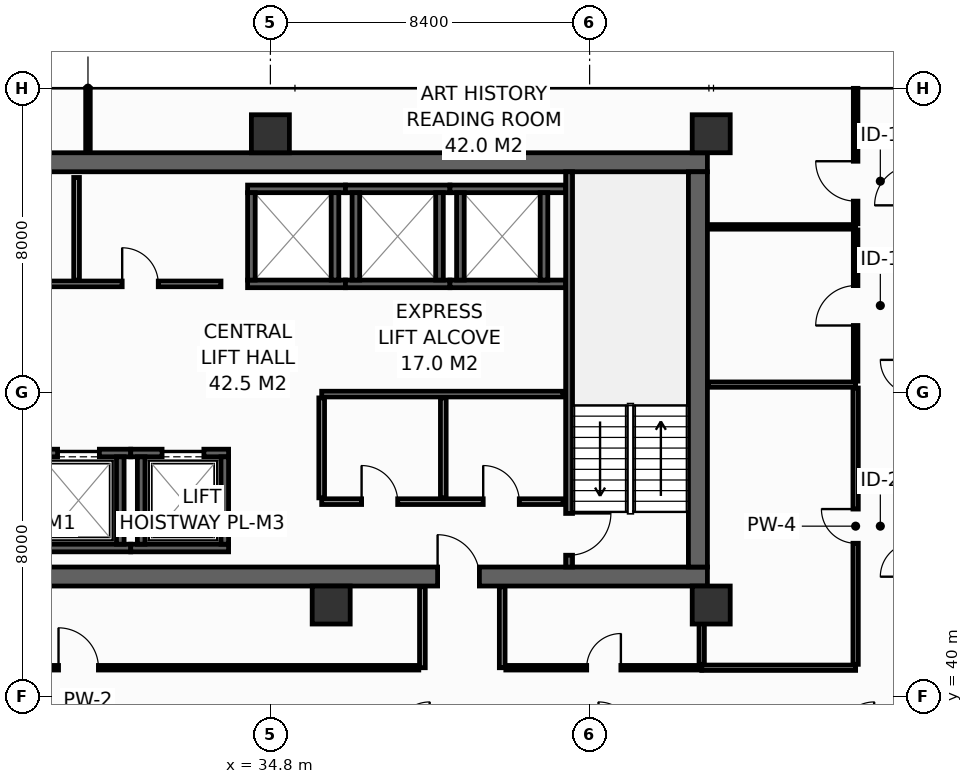
"""IFC4 building model, lengths in metres.
Left out: names, types, materials, properties, quantities, classifications, styles, units other than length and angle.
Written with IfcOpenShell. Run it as: python <this file> out.ifc"""

import sys

from ifc_helpers import new_model, si_unit, direction, frame, frame_2d, origin, origin_2d, place, context, subcontext, project, spatial, rectangle, hollow_rectangle, extrude, element, fill, save


model = new_model("IFC4")
c1 = context("Model", 3, precision=1e-05, world=origin(), true_north=direction((0.0, 1.0)))
c2 = subcontext(c1, "Body", "Model", "MODEL_VIEW")
j1 = project(units=[si_unit("LENGTHUNIT", "METRE"), si_unit("PLANEANGLEUNIT", "RADIAN")], contexts=[c1])
p1 = place(None, origin())
s1 = spatial("IfcSite", under=j1, at=p1, CompositionType="ELEMENT")
p2 = place(p1, origin())
s2 = spatial("IfcBuilding", under=s1, at=p2, CompositionType="ELEMENT")
p3 = place(p2, frame((0.0, 0.0, 137.2)))
s3 = spatial("IfcBuildingStorey", under=s2, at=p3, CompositionType="ELEMENT", Elevation=137.2)
p4 = place(p3, frame((13.6, 43.15, 0.0), z_axis=(0.0, 0.0, 1.0), x_axis=(1.0, 0.0, 0.0)))
e1 = element("IfcWall", 1, at=p4, inside=s3, PredefinedType="SHEAR", context=c2, shape_type="SweptSolid", body=[
    extrude(rectangle(XDim=32.7, YDim=0.5, at=frame_2d((16.35, 0.0))), origin(), (0.0, 0.0, 1.0), 3.55),
])
p5 = place(p4, frame((5.4, 0.0, 0.0)))
e2 = element("IfcOpeningElement", 2, at=p5, cuts=e1, PredefinedType="OPENING", context=c2, shape_type="SweptSolid", body=[
    extrude(rectangle(XDim=1.1, YDim=2.15, at=frame_2d((0.55, 1.075))), frame((0.0, 0.26, 0.0), z_axis=(0.0, -1.0, 0.0), x_axis=(1.0, 0.0, 0.0)), (0.0, 0.0, 1.0), 0.52),
])
p6 = place(p4, frame((25.6, 0.0, 0.0)))
e3 = element("IfcOpeningElement", 3, at=p6, cuts=e1, PredefinedType="OPENING", context=c2, shape_type="SweptSolid", body=[
    extrude(rectangle(XDim=1.1, YDim=2.15, at=frame_2d((0.55, 1.075))), frame((0.0, 0.26, 0.0), z_axis=(0.0, -1.0, 0.0), x_axis=(1.0, 0.0, 0.0)), (0.0, 0.0, 1.0), 0.52),
])
p7 = place(p3, frame((13.6, 54.05, 0.0), z_axis=(0.0, 0.0, 1.0), x_axis=(1.0, 0.0, 0.0)))
e4 = element("IfcWall", 4, at=p7, inside=s3, PredefinedType="SHEAR", context=c2, shape_type="SweptSolid", body=[
    extrude(rectangle(XDim=32.7, YDim=0.5, at=frame_2d((16.35, 0.0))), origin(), (0.0, 0.0, 1.0), 3.55),
])
p8 = place(p3, frame((46.05, 43.4, 0.0), z_axis=(0.0, 0.0, 1.0), x_axis=(0.0, 1.0, 0.0)))
e5 = element("IfcWall", 5, at=p8, inside=s3, PredefinedType="SHEAR", context=c2, shape_type="SweptSolid", body=[
    extrude(rectangle(XDim=10.4, YDim=0.5, at=frame_2d((5.2, 0.0))), origin(), (0.0, 0.0, 1.0), 3.55),
])
for number, where, z_axis, x_axis in (
    (6, (34.8, 54.8, 0.0), (0.0, 0.0, 1.0), (1.0, 0.0, 0.0)),
    (7, (46.4, 54.8, 0.0), (0.0, 0.0, 1.0), (1.0, 0.0, 0.0)),
    (8, (36.4, 42.4, 0.0), (0.0, 0.0, 1.0), (1.0, 0.0, 0.0)),
    (9, (46.4, 42.4, 0.0), (0.0, 0.0, 1.0), (1.0, 0.0, 0.0)),
):
    element("IfcColumn", number, at=place(p3, frame(where, z_axis=z_axis, x_axis=x_axis)), inside=s3, PredefinedType="COLUMN", context=c2, shape_type="SweptSolid", body=[
        extrude(hollow_rectangle(XDim=1.0, YDim=1.0, WallThickness=0.045, at=origin_2d()), origin(), (0.0, 0.0, 1.0), 3.8),
    ])
p9 = place(p3, frame((28.375, 43.9, 0.0), z_axis=(0.0, 0.0, 1.0), x_axis=(1.0, 0.0, 0.0)))
e10 = element("IfcWall", 10, at=p9, inside=s3, PredefinedType="SHEAR", context=c2, shape_type="SweptSolid", body=[
    extrude(rectangle(XDim=2.75, YDim=0.2, at=frame_2d((1.375, 0.0))), origin(), (0.0, 0.0, 1.0), 3.55),
])
p10 = place(p3, frame((28.375, 46.4, 0.0), z_axis=(0.0, 0.0, 1.0), x_axis=(1.0, 0.0, 0.0)))
e11 = element("IfcWall", 11, at=p10, inside=s3, PredefinedType="SHEAR", context=c2, shape_type="SweptSolid", body=[
    extrude(rectangle(XDim=2.75, YDim=0.2, at=frame_2d((1.375, 0.0))), origin(), (0.0, 0.0, 1.0), 3.55),
])
p11 = place(p10, frame((0.825, 0.0, 0.0)))
e12 = element("IfcOpeningElement", 12, at=p11, cuts=e11, PredefinedType="OPENING", context=c2, shape_type="SweptSolid", body=[
    extrude(rectangle(XDim=1.1, YDim=2.2, at=frame_2d((0.55, 1.1))), frame((0.0, 0.11, 0.0), z_axis=(0.0, -1.0, 0.0), x_axis=(1.0, 0.0, 0.0)), (0.0, 0.0, 1.0), 0.22),
])
p12 = place(p3, frame((30.85, 44.0, 0.0), z_axis=(0.0, 0.0, 1.0), x_axis=(0.0, 1.0, 0.0)))
e13 = element("IfcWall", 13, at=p12, inside=s3, PredefinedType="SHEAR", context=c2, shape_type="SweptSolid", body=[
    extrude(rectangle(XDim=2.3, YDim=0.2, at=frame_2d((1.15, 0.0))), origin(), (0.0, 0.0, 1.0), 3.55),
])
p13 = place(p3, frame((31.125, 43.9, 0.0), z_axis=(0.0, 0.0, 1.0), x_axis=(1.0, 0.0, 0.0)))
e14 = element("IfcWall", 14, at=p13, inside=s3, PredefinedType="SHEAR", context=c2, shape_type="SweptSolid", body=[
    extrude(rectangle(XDim=2.575, YDim=0.2, at=frame_2d((1.288, 0.0))), origin(), (0.0, 0.0, 1.0), 3.55),
])
p14 = place(p3, frame((31.125, 46.4, 0.0), z_axis=(0.0, 0.0, 1.0), x_axis=(1.0, 0.0, 0.0)))
e15 = element("IfcWall", 15, at=p14, inside=s3, PredefinedType="SHEAR", context=c2, shape_type="SweptSolid", body=[
    extrude(rectangle(XDim=2.575, YDim=0.2, at=frame_2d((1.288, 0.0))), origin(), (0.0, 0.0, 1.0), 3.55),
])
p15 = place(p14, frame((0.825, 0.0, 0.0)))
e16 = element("IfcOpeningElement", 16, at=p15, cuts=e15, PredefinedType="OPENING", context=c2, shape_type="SweptSolid", body=[
    extrude(rectangle(XDim=1.1, YDim=2.2, at=frame_2d((0.55, 1.1))), frame((0.0, 0.11, 0.0), z_axis=(0.0, -1.0, 0.0), x_axis=(1.0, 0.0, 0.0)), (0.0, 0.0, 1.0), 0.22),
])
for number, where, z_axis, x_axis in (
    (17, (31.4, 44.0, 0.0), (0.0, 0.0, 1.0), (0.0, 1.0, 0.0)),
    (18, (33.6, 44.0, 0.0), (0.0, 0.0, 1.0), (0.0, 1.0, 0.0)),
):
    element("IfcWall", number, at=place(p3, frame(where, z_axis=z_axis, x_axis=x_axis)), inside=s3, PredefinedType="SHEAR", context=c2, shape_type="SweptSolid", body=[
        extrude(rectangle(XDim=2.3, YDim=0.2, at=frame_2d((1.15, 0.0))), origin(), (0.0, 0.0, 1.0), 3.55),
    ])
for number, where, z_axis, x_axis in (
    (19, (34.2, 50.85, 0.0), (0.0, 0.0, 1.0), (1.0, 0.0, 0.0)),
    (20, (34.2, 53.35, 0.0), (0.0, 0.0, 1.0), (1.0, 0.0, 0.0)),
):
    element("IfcWall", number, at=place(p3, frame(where, z_axis=z_axis, x_axis=x_axis)), inside=s3, PredefinedType="SHEAR", context=c2, shape_type="SweptSolid", body=[
        extrude(rectangle(XDim=2.575, YDim=0.2, at=frame_2d((1.288, 0.0))), origin(), (0.0, 0.0, 1.0), 3.55),
    ])
for number, where, z_axis, x_axis in (
    (21, (34.3, 50.95, 0.0), (0.0, 0.0, 1.0), (0.0, 1.0, 0.0)),
    (22, (36.5, 50.95, 0.0), (0.0, 0.0, 1.0), (0.0, 1.0, 0.0)),
):
    element("IfcWall", number, at=place(p3, frame(where, z_axis=z_axis, x_axis=x_axis)), inside=s3, PredefinedType="SHEAR", context=c2, shape_type="SweptSolid", body=[
        extrude(rectangle(XDim=2.3, YDim=0.2, at=frame_2d((1.15, 0.0))), origin(), (0.0, 0.0, 1.0), 3.55),
    ])
for number, where, z_axis, x_axis in (
    (23, (36.775, 50.85, 0.0), (0.0, 0.0, 1.0), (1.0, 0.0, 0.0)),
    (24, (36.775, 53.35, 0.0), (0.0, 0.0, 1.0), (1.0, 0.0, 0.0)),
):
    element("IfcWall", number, at=place(p3, frame(where, z_axis=z_axis, x_axis=x_axis)), inside=s3, PredefinedType="SHEAR", context=c2, shape_type="SweptSolid", body=[
        extrude(rectangle(XDim=2.75, YDim=0.2, at=frame_2d((1.375, 0.0))), origin(), (0.0, 0.0, 1.0), 3.55),
    ])
for number, where, z_axis, x_axis in (
    (25, (37.05, 50.95, 0.0), (0.0, 0.0, 1.0), (0.0, 1.0, 0.0)),
    (26, (39.25, 50.95, 0.0), (0.0, 0.0, 1.0), (0.0, 1.0, 0.0)),
):
    element("IfcWall", number, at=place(p3, frame(where, z_axis=z_axis, x_axis=x_axis)), inside=s3, PredefinedType="SHEAR", context=c2, shape_type="SweptSolid", body=[
        extrude(rectangle(XDim=2.3, YDim=0.2, at=frame_2d((1.15, 0.0))), origin(), (0.0, 0.0, 1.0), 3.55),
    ])
for number, where, z_axis, x_axis in (
    (27, (39.525, 50.85, 0.0), (0.0, 0.0, 1.0), (1.0, 0.0, 0.0)),
    (28, (39.525, 53.35, 0.0), (0.0, 0.0, 1.0), (1.0, 0.0, 0.0)),
):
    element("IfcWall", number, at=place(p3, frame(where, z_axis=z_axis, x_axis=x_axis)), inside=s3, PredefinedType="SHEAR", context=c2, shape_type="SweptSolid", body=[
        extrude(rectangle(XDim=3.045, YDim=0.2, at=frame_2d((1.522, 0.0))), origin(), (0.0, 0.0, 1.0), 3.55),
    ])
for number, where, z_axis, x_axis in (
    (29, (39.8, 50.95, 0.0), (0.0, 0.0, 1.0), (0.0, 1.0, 0.0)),
    (30, (42.0, 50.95, 0.0), (0.0, 0.0, 1.0), (0.0, 1.0, 0.0)),
):
    element("IfcWall", number, at=place(p3, frame(where, z_axis=z_axis, x_axis=x_axis)), inside=s3, PredefinedType="SHEAR", context=c2, shape_type="SweptSolid", body=[
        extrude(rectangle(XDim=2.3, YDim=0.2, at=frame_2d((1.15, 0.0))), origin(), (0.0, 0.0, 1.0), 3.55),
    ])
p16 = place(p3, frame((42.66, 53.8, 0.0), z_axis=(0.0, 0.0, 1.0), x_axis=(0.0, -1.0, 0.0)))
e31 = element("IfcWall", 31, at=p16, inside=s3, PredefinedType="SHEAR", context=c2, shape_type="SweptSolid", body=[
    extrude(rectangle(XDim=10.4, YDim=0.18, at=frame_2d((5.2, 0.0))), origin(), (0.0, 0.0, 1.0), 3.55),
])
p17 = place(p16, frame((8.99, 0.0, 0.0)))
e32 = element("IfcOpeningElement", 32, at=p17, cuts=e31, PredefinedType="OPENING", context=c2, shape_type="SweptSolid", body=[
    extrude(rectangle(XDim=1.1, YDim=2.15, at=frame_2d((0.55, 1.075))), frame((0.0, 0.1, 0.0), z_axis=(0.0, -1.0, 0.0), x_axis=(1.0, 0.0, 0.0)), (0.0, 0.0, 1.0), 0.2),
])
p18 = place(p3, frame((36.15, 45.12, 0.0), z_axis=(0.0, 0.0, 1.0), x_axis=(1.0, 0.0, 0.0)))
e33 = element("IfcWall", 33, at=p18, inside=s3, PredefinedType="PARTITIONING", context=c2, shape_type="SweptSolid", body=[
    extrude(rectangle(XDim=6.35, YDim=0.15, at=frame_2d((3.175, 0.0))), origin(), (0.0, 0.0, 1.0), 3.55),
])
p19 = place(p18, frame((1.05, 0.0, 0.0)))
e34 = element("IfcOpeningElement", 34, at=p19, cuts=e33, PredefinedType="OPENING", context=c2, shape_type="SweptSolid", body=[
    extrude(rectangle(XDim=0.95, YDim=2.15, at=frame_2d((0.475, 1.075))), frame((0.0, 0.085, 0.0), z_axis=(0.0, -1.0, 0.0), x_axis=(1.0, 0.0, 0.0)), (0.0, 0.0, 1.0), 0.17),
])
p20 = place(p18, frame((4.25, 0.0, 0.0)))
e35 = element("IfcOpeningElement", 35, at=p20, cuts=e33, PredefinedType="OPENING", context=c2, shape_type="SweptSolid", body=[
    extrude(rectangle(XDim=0.95, YDim=2.15, at=frame_2d((0.475, 1.075))), frame((0.0, 0.085, 0.0), z_axis=(0.0, -1.0, 0.0), x_axis=(1.0, 0.0, 0.0)), (0.0, 0.0, 1.0), 0.17),
])
p21 = place(p3, frame((36.15, 47.95, 0.0), z_axis=(0.0, 0.0, 1.0), x_axis=(1.0, 0.0, 0.0)))
e36 = element("IfcWall", 36, at=p21, inside=s3, PredefinedType="PARTITIONING", context=c2, shape_type="SweptSolid", body=[
    extrude(rectangle(XDim=6.35, YDim=0.15, at=frame_2d((3.175, 0.0))), origin(), (0.0, 0.0, 1.0), 3.55),
])
for number, where, z_axis, x_axis in (
    (37, (36.15, 45.22, 0.0), (0.0, 0.0, 1.0), (0.0, 1.0, 0.0)),
    (38, (39.35, 45.22, 0.0), (0.0, 0.0, 1.0), (0.0, 1.0, 0.0)),
):
    element("IfcWall", number, at=place(p3, frame(where, z_axis=z_axis, x_axis=x_axis)), inside=s3, PredefinedType="PARTITIONING", context=c2, shape_type="SweptSolid", body=[
        extrude(rectangle(XDim=2.63, YDim=0.15, at=frame_2d((1.315, 0.0))), origin(), (0.0, 0.0, 1.0), 3.55),
    ])
p22 = place(p3, frame((25.85, 50.85, 0.0), z_axis=(0.0, 0.0, 1.0), x_axis=(1.0, 0.0, 0.0)))
e39 = element("IfcWall", 39, at=p22, inside=s3, PredefinedType="PARTITIONING", context=c2, shape_type="SweptSolid", body=[
    extrude(rectangle(XDim=7.65, YDim=0.15, at=frame_2d((3.825, 0.0))), origin(), (0.0, 0.0, 1.0), 3.55),
])
p23 = place(p22, frame((1.25, 0.0, 0.0)))
e40 = element("IfcOpeningElement", 40, at=p23, cuts=e39, PredefinedType="OPENING", context=c2, shape_type="SweptSolid", body=[
    extrude(rectangle(XDim=0.95, YDim=2.15, at=frame_2d((0.475, 1.075))), frame((0.0, 0.085, 0.0), z_axis=(0.0, -1.0, 0.0), x_axis=(1.0, 0.0, 0.0)), (0.0, 0.0, 1.0), 0.17),
])
p24 = place(p22, frame((5.05, 0.0, 0.0)))
e41 = element("IfcOpeningElement", 41, at=p24, cuts=e39, PredefinedType="OPENING", context=c2, shape_type="SweptSolid", body=[
    extrude(rectangle(XDim=0.95, YDim=2.15, at=frame_2d((0.475, 1.075))), frame((0.0, 0.085, 0.0), z_axis=(0.0, -1.0, 0.0), x_axis=(1.0, 0.0, 0.0)), (0.0, 0.0, 1.0), 0.17),
])
p25 = place(p3, frame((29.7, 50.95, 0.0), z_axis=(0.0, 0.0, 1.0), x_axis=(0.0, 1.0, 0.0)))
e42 = element("IfcWall", 42, at=p25, inside=s3, PredefinedType="PARTITIONING", context=c2, shape_type="SweptSolid", body=[
    extrude(rectangle(XDim=2.7, YDim=0.15, at=frame_2d((1.35, 0.0))), origin(), (0.0, 0.0, 1.0), 3.55),
])
p26 = place(p3, frame((46.15, 40.75, 0.0), z_axis=(0.0, 0.0, 1.0), x_axis=(1.0, 0.0, 0.0)))
e43 = element("IfcWall", 43, at=p26, inside=s3, PredefinedType="PARTITIONING", context=c2, shape_type="SweptSolid", body=[
    extrude(rectangle(XDim=4.05, YDim=0.14, at=frame_2d((2.025, 0.0))), origin(), (0.0, 0.0, 1.0), 3.55),
])
p27 = place(p3, frame((46.15, 40.84, 0.0), z_axis=(0.0, 0.0, 1.0), x_axis=(0.0, 1.0, 0.0)))
e44 = element("IfcWall", 44, at=p27, inside=s3, PredefinedType="PARTITIONING", context=c2, shape_type="SweptSolid", body=[
    extrude(rectangle(XDim=2.04, YDim=0.14, at=frame_2d((1.02, 0.0))), origin(), (0.0, 0.0, 1.0), 3.55),
])
p28 = place(p3, frame((46.32, 48.2, 0.0), z_axis=(0.0, 0.0, 1.0), x_axis=(1.0, 0.0, 0.0)))
e45 = element("IfcWall", 45, at=p28, inside=s3, PredefinedType="PARTITIONING", context=c2, shape_type="SweptSolid", body=[
    extrude(rectangle(XDim=3.88, YDim=0.14, at=frame_2d((1.94, 0.0))), origin(), (0.0, 0.0, 1.0), 3.55),
])
p29 = place(p3, frame((50.2, 40.84, 0.0), z_axis=(0.0, 0.0, 1.0), x_axis=(0.0, 1.0, 0.0)))
e46 = element("IfcWall", 46, at=p29, inside=s3, PredefinedType="PARTITIONING", context=c2, shape_type="SweptSolid", body=[
    extrude(rectangle(XDim=7.27, YDim=0.14, at=frame_2d((3.635, 0.0))), origin(), (0.0, 0.0, 1.0), 2.835),
])
p30 = place(p29, frame((3.185, 0.0, 0.0)))
e47 = element("IfcOpeningElement", 47, at=p30, cuts=e46, PredefinedType="OPENING", context=c2, shape_type="SweptSolid", body=[
    extrude(rectangle(XDim=0.9, YDim=2.1, at=frame_2d((0.45, 1.05))), frame((0.0, 0.08, 0.0), z_axis=(0.0, -1.0, 0.0), x_axis=(1.0, 0.0, 0.0)), (0.0, 0.0, 1.0), 0.16),
])
p31 = place(p3, frame((46.32, 52.35, 0.0), z_axis=(0.0, 0.0, 1.0), x_axis=(1.0, 0.0, 0.0)))
e48 = element("IfcWall", 48, at=p31, inside=s3, PredefinedType="PARTITIONING", context=c2, shape_type="SweptSolid", body=[
    extrude(rectangle(XDim=3.88, YDim=0.12, at=frame_2d((1.94, 0.0))), origin(), (0.0, 0.0, 1.0), 3.55),
])
p32 = place(p3, frame((30.0, 54.32, 0.0), z_axis=(0.0, 0.0, 1.0), x_axis=(0.0, 1.0, 0.0)))
e49 = element("IfcWall", 49, at=p32, inside=s3, PredefinedType="PARTITIONING", context=c2, shape_type="SweptSolid", body=[
    extrude(rectangle(XDim=1.675, YDim=0.12, at=frame_2d((0.837, 0.0))), origin(), (0.0, 0.0, 1.0), 2.935),
])
p33 = place(p3, frame((50.2, 48.29, 0.0), z_axis=(0.0, 0.0, 1.0), x_axis=(0.0, 1.0, 0.0)))
e50 = element("IfcWall", 50, at=p33, inside=s3, PredefinedType="PARTITIONING", context=c2, shape_type="SweptSolid", body=[
    extrude(rectangle(XDim=3.98, YDim=0.12, at=frame_2d((1.99, 0.0))), origin(), (0.0, 0.0, 1.0), 3.55),
])
p34 = place(p33, frame((1.465, 0.0, 0.0)))
e51 = element("IfcOpeningElement", 51, at=p34, cuts=e50, PredefinedType="OPENING", context=c2, shape_type="SweptSolid", body=[
    extrude(rectangle(XDim=1.05, YDim=2.15, at=frame_2d((0.525, 1.075))), frame((0.0, 0.07, 0.0), z_axis=(0.0, -1.0, 0.0), x_axis=(1.0, 0.0, 0.0)), (0.0, 0.0, 1.0), 0.14),
])
p35 = place(p3, frame((50.2, 52.43, 0.0), z_axis=(0.0, 0.0, 1.0), x_axis=(0.0, 1.0, 0.0)))
e52 = element("IfcWall", 52, at=p35, inside=s3, PredefinedType="PARTITIONING", context=c2, shape_type="SweptSolid", body=[
    extrude(rectangle(XDim=3.565, YDim=0.12, at=frame_2d((1.783, 0.0))), origin(), (0.0, 0.0, 1.0), 2.935),
])
p36 = place(p35, frame((0.597, 0.0, 0.0)))
e53 = element("IfcOpeningElement", 53, at=p36, cuts=e52, PredefinedType="OPENING", context=c2, shape_type="SweptSolid", body=[
    extrude(rectangle(XDim=1.05, YDim=2.15, at=frame_2d((0.525, 1.075))), frame((0.0, 0.07, 0.0), z_axis=(0.0, -1.0, 0.0), x_axis=(1.0, 0.0, 0.0)), (0.0, 0.0, 1.0), 0.14),
])
for number, where, z_axis, x_axis in (
    (54, (38.8, 40.75, 0.0), (0.0, 0.0, 1.0), (0.0, 1.0, 0.0)),
    (55, (40.9, 40.75, 0.0), (0.0, 0.0, 1.0), (0.0, 1.0, 0.0)),
):
    element("IfcWall", number, at=place(p3, frame(where, z_axis=z_axis, x_axis=x_axis)), inside=s3, PredefinedType="PARTITIONING", context=c2, shape_type="SweptSolid", body=[
        extrude(rectangle(XDim=2.13, YDim=0.15, at=frame_2d((1.065, 0.0))), origin(), (0.0, 0.0, 1.0), 3.55),
    ])
p37 = place(p3, frame((20.795, 40.75, 0.0), z_axis=(0.0, 0.0, 1.0), x_axis=(1.0, 0.0, 0.0)))
e56 = element("IfcWall", 56, at=p37, inside=s3, PredefinedType="PARTITIONING", context=c2, shape_type="SweptSolid", body=[
    extrude(rectangle(XDim=17.91, YDim=0.12, at=frame_2d((8.955, 0.0))), origin(), (0.0, 0.0, 1.0), 2.835),
])
p38 = place(p37, frame((8.43, 0.0, 0.0)))
e57 = element("IfcOpeningElement", 57, at=p38, cuts=e56, PredefinedType="OPENING", context=c2, shape_type="SweptSolid", body=[
    extrude(rectangle(XDim=1.05, YDim=2.15, at=frame_2d((0.525, 1.075))), frame((0.0, 0.07, 0.0), z_axis=(0.0, -1.0, 0.0), x_axis=(1.0, 0.0, 0.0)), (0.0, 0.0, 1.0), 0.14),
])
p39 = place(p3, frame((40.995, 40.75, 0.0), z_axis=(0.0, 0.0, 1.0), x_axis=(1.0, 0.0, 0.0)))
e58 = element("IfcWall", 58, at=p39, inside=s3, PredefinedType="PARTITIONING", context=c2, shape_type="SweptSolid", body=[
    extrude(rectangle(XDim=5.155, YDim=0.12, at=frame_2d((2.577, 0.0))), origin(), (0.0, 0.0, 1.0), 3.55),
])
p40 = place(p39, frame((2.128, 0.0, 0.0)))
e59 = element("IfcOpeningElement", 59, at=p40, cuts=e58, PredefinedType="OPENING", context=c2, shape_type="SweptSolid", body=[
    extrude(rectangle(XDim=0.9, YDim=2.1, at=frame_2d((0.45, 1.05))), frame((0.0, 0.07, 0.0), z_axis=(0.0, -1.0, 0.0), x_axis=(1.0, 0.0, 0.0)), (0.0, 0.0, 1.0), 0.14),
])
p41 = place(p11, origin())
e60 = element("IfcDoor", 60, at=p41, inside=s3, OperationType="SLIDING_TO_LEFT", PredefinedType="DOOR", context=c2, shape_type="SweptSolid", body=[
    extrude(rectangle(XDim=1.1, YDim=2.2, at=frame_2d((0.55, 1.1))), frame((0.0, 0.025, 0.0), z_axis=(0.0, -1.0, 0.0), x_axis=(1.0, 0.0, 0.0)), (0.0, 0.0, 1.0), 0.05),
])
fill(e12, e60)
p42 = place(p15, origin())
e61 = element("IfcDoor", 61, at=p42, inside=s3, OperationType="SLIDING_TO_LEFT", PredefinedType="DOOR", context=c2, shape_type="SweptSolid", body=[
    extrude(rectangle(XDim=1.1, YDim=2.2, at=frame_2d((0.55, 1.1))), frame((0.0, 0.025, 0.0), z_axis=(0.0, -1.0, 0.0), x_axis=(1.0, 0.0, 0.0)), (0.0, 0.0, 1.0), 0.05),
])
fill(e16, e61)
p43 = place(p17, origin())
e62 = element("IfcDoor", 62, at=p43, inside=s3, OperationType="SINGLE_SWING_LEFT", PredefinedType="DOOR", context=c2, shape_type="SweptSolid", body=[
    extrude(rectangle(XDim=1.1, YDim=2.15, at=frame_2d((0.55, 1.075))), frame((0.0, 0.025, 0.0), z_axis=(0.0, -1.0, 0.0), x_axis=(1.0, 0.0, 0.0)), (0.0, 0.0, 1.0), 0.05),
])
fill(e32, e62)
p44 = place(p6, origin())
e63 = element("IfcDoor", 63, at=p44, inside=s3, OperationType="SINGLE_SWING_LEFT", PredefinedType="DOOR", context=c2, shape_type="SweptSolid", body=[
    extrude(rectangle(XDim=1.1, YDim=2.15, at=frame_2d((0.55, 1.075))), frame((0.0, 0.025, 0.0), z_axis=(0.0, -1.0, 0.0), x_axis=(1.0, 0.0, 0.0)), (0.0, 0.0, 1.0), 0.05),
])
fill(e3, e63)
p45 = place(p19, origin())
e64 = element("IfcDoor", 64, at=p45, inside=s3, OperationType="SINGLE_SWING_LEFT", PredefinedType="DOOR", context=c2, shape_type="SweptSolid", body=[
    extrude(rectangle(XDim=0.95, YDim=2.15, at=frame_2d((0.475, 1.075))), frame((0.0, 0.025, 0.0), z_axis=(0.0, -1.0, 0.0), x_axis=(1.0, 0.0, 0.0)), (0.0, 0.0, 1.0), 0.05),
])
fill(e34, e64)
p46 = place(p20, origin())
e65 = element("IfcDoor", 65, at=p46, inside=s3, OperationType="SINGLE_SWING_LEFT", PredefinedType="DOOR", context=c2, shape_type="SweptSolid", body=[
    extrude(rectangle(XDim=0.95, YDim=2.15, at=frame_2d((0.475, 1.075))), frame((0.0, 0.025, 0.0), z_axis=(0.0, -1.0, 0.0), x_axis=(1.0, 0.0, 0.0)), (0.0, 0.0, 1.0), 0.05),
])
fill(e35, e65)
p47 = place(p24, origin())
e66 = element("IfcDoor", 66, at=p47, inside=s3, OperationType="SINGLE_SWING_LEFT", PredefinedType="DOOR", context=c2, shape_type="SweptSolid", body=[
    extrude(rectangle(XDim=0.95, YDim=2.15, at=frame_2d((0.475, 1.075))), frame((0.0, 0.025, 0.0), z_axis=(0.0, -1.0, 0.0), x_axis=(1.0, 0.0, 0.0)), (0.0, 0.0, 1.0), 0.05),
])
fill(e41, e66)
p48 = place(p30, origin())
e67 = element("IfcDoor", 67, at=p48, inside=s3, OperationType="SINGLE_SWING_RIGHT", PredefinedType="DOOR", context=c2, shape_type="SweptSolid", body=[
    extrude(rectangle(XDim=0.9, YDim=2.1, at=frame_2d((0.45, 1.05))), frame((0.0, 0.025, 0.0), z_axis=(0.0, -1.0, 0.0), x_axis=(1.0, 0.0, 0.0)), (0.0, 0.0, 1.0), 0.05),
])
fill(e47, e67)
p49 = place(p34, origin())
e68 = element("IfcDoor", 68, at=p49, inside=s3, OperationType="SINGLE_SWING_LEFT", PredefinedType="DOOR", context=c2, shape_type="SweptSolid", body=[
    extrude(rectangle(XDim=1.05, YDim=2.15, at=frame_2d((0.525, 1.075))), frame((0.0, 0.025, 0.0), z_axis=(0.0, -1.0, 0.0), x_axis=(1.0, 0.0, 0.0)), (0.0, 0.0, 1.0), 0.05),
])
fill(e51, e68)
p50 = place(p36, origin())
e69 = element("IfcDoor", 69, at=p50, inside=s3, OperationType="SINGLE_SWING_RIGHT", PredefinedType="DOOR", context=c2, shape_type="SweptSolid", body=[
    extrude(rectangle(XDim=1.05, YDim=2.15, at=frame_2d((0.525, 1.075))), frame((0.0, 0.025, 0.0), z_axis=(0.0, -1.0, 0.0), x_axis=(1.0, 0.0, 0.0)), (0.0, 0.0, 1.0), 0.05),
])
fill(e53, e69)
p51 = place(p38, origin())
e70 = element("IfcDoor", 70, at=p51, inside=s3, OperationType="SINGLE_SWING_LEFT", PredefinedType="DOOR", context=c2, shape_type="SweptSolid", body=[
    extrude(rectangle(XDim=1.05, YDim=2.15, at=frame_2d((0.525, 1.075))), frame((0.0, 0.025, 0.0), z_axis=(0.0, -1.0, 0.0), x_axis=(1.0, 0.0, 0.0)), (0.0, 0.0, 1.0), 0.05),
])
fill(e57, e70)
p52 = place(p40, origin())
e71 = element("IfcDoor", 71, at=p52, inside=s3, OperationType="SINGLE_SWING_RIGHT", PredefinedType="DOOR", context=c2, shape_type="SweptSolid", body=[
    extrude(rectangle(XDim=0.9, YDim=2.1, at=frame_2d((0.45, 1.05))), frame((0.0, 0.025, 0.0), z_axis=(0.0, -1.0, 0.0), x_axis=(1.0, 0.0, 0.0)), (0.0, 0.0, 1.0), 0.05),
])
fill(e59, e71)
save(model, sys.argv[1])
